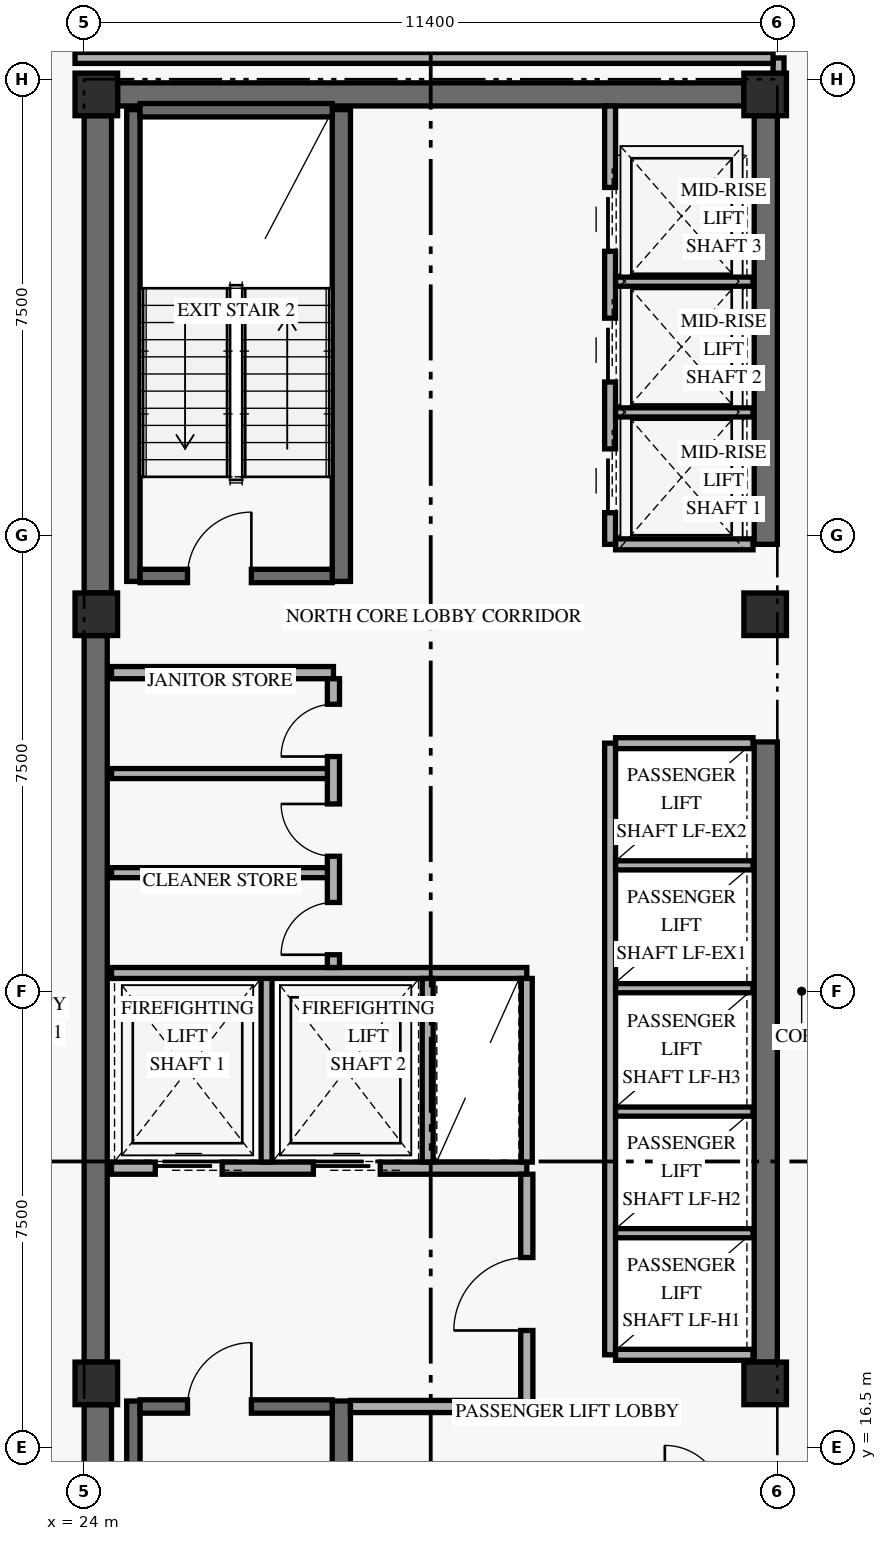
"""IFC4 building model, lengths in metres.
Left out: names, types, materials, properties, quantities, classifications, styles, units other than length and angle.
Written with IfcOpenShell. Run it as: python <this file> out.ifc"""

import sys

from ifc_helpers import new_model, si_unit, direction, frame, frame_2d, origin, origin_2d, place, context, subcontext, project, spatial, rectangle, extrude, element, fill, save


model = new_model("IFC4")
c1 = context("Model", 3, precision=1e-05, world=origin(), true_north=direction((0.0, 1.0)))
c2 = subcontext(c1, "Body", "Model", "MODEL_VIEW")
j1 = project(units=[si_unit("LENGTHUNIT", "METRE"), si_unit("PLANEANGLEUNIT", "RADIAN")], contexts=[c1])
p1 = place(None, origin())
s1 = spatial("IfcSite", under=j1, at=p1, CompositionType="ELEMENT")
p2 = place(p1, origin())
s2 = spatial("IfcBuilding", under=s1, at=p2, CompositionType="ELEMENT")
p3 = place(p2, frame((0.0, 0.0, 173.4)))
s3 = spatial("IfcBuildingStorey", under=s2, at=p3, CompositionType="ELEMENT", Elevation=173.4)
p4 = place(p3, frame((24.225, 9.6, 0.0), z_axis=(0.0, 0.0, 1.0), x_axis=(0.0, 1.0, 0.0)))
e1 = element("IfcWall", 1, at=p4, inside=s3, PredefinedType="SHEAR", context=c2, shape_type="SweptSolid", body=[
    extrude(rectangle(XDim=7.6, YDim=0.45, at=frame_2d((3.8, 0.0))), origin(), (0.0, 0.0, 1.0), 3.348),
])
p5 = place(p3, frame((24.19, 17.9, 0.0), z_axis=(0.0, 0.0, 1.0), x_axis=(0.0, 1.0, 0.0)))
e2 = element("IfcWall", 2, at=p5, inside=s3, PredefinedType="SHEAR", context=c2, shape_type="SweptSolid", body=[
    extrude(rectangle(XDim=11.95, YDim=0.38, at=frame_2d((5.975, 0.0))), origin(), (0.0, 0.0, 1.0), 3.348),
])
p6 = place(p3, frame((24.225, 30.55, 0.0), z_axis=(0.0, 0.0, 1.0), x_axis=(0.0, 1.0, 0.0)))
e3 = element("IfcWall", 3, at=p6, inside=s3, PredefinedType="SHEAR", context=c2, shape_type="SweptSolid", body=[
    extrude(rectangle(XDim=7.85, YDim=0.45, at=frame_2d((3.925, 0.0))), origin(), (0.0, 0.0, 1.0), 3.348),
])
p7 = place(p3, frame((35.21, 17.9, 0.0), z_axis=(0.0, 0.0, 1.0), x_axis=(0.0, 1.0, 0.0)))
e4 = element("IfcWall", 4, at=p7, inside=s3, PredefinedType="SHEAR", context=c2, shape_type="SweptSolid", body=[
    extrude(rectangle(XDim=10.2, YDim=0.38, at=frame_2d((5.1, 0.0))), origin(), (0.0, 0.0, 1.0), 3.348),
])
p8 = place(p3, frame((35.21, 31.35, 0.0), z_axis=(0.0, 0.0, 1.0), x_axis=(0.0, 1.0, 0.0)))
e5 = element("IfcWall", 5, at=p8, inside=s3, PredefinedType="SHEAR", context=c2, shape_type="SweptSolid", body=[
    extrude(rectangle(XDim=7.05, YDim=0.38, at=frame_2d((3.525, 0.0))), origin(), (0.0, 0.0, 1.0), 3.348),
])
p9 = place(p3, frame((24.55, 38.75, 0.0), z_axis=(0.0, 0.0, 1.0), x_axis=(1.0, 0.0, 0.0)))
e6 = element("IfcWall", 6, at=p9, inside=s3, PredefinedType="SHEAR", context=c2, shape_type="SweptSolid", body=[
    extrude(rectangle(XDim=10.3, YDim=0.38, at=frame_2d((5.15, 0.0))), origin(), (0.0, 0.0, 1.0), 3.96),
])
p10 = place(p3, frame((24.81, 9.5, 0.0), z_axis=(0.0, 0.0, 1.0), x_axis=(0.0, 1.0, 0.0)))
e7 = element("IfcWall", 7, at=p10, inside=s3, PredefinedType="SHEAR", context=c2, shape_type="SweptSolid", body=[
    extrude(rectangle(XDim=7.76, YDim=0.22, at=frame_2d((3.88, 0.0))), origin(), (0.0, 0.0, 1.0), 3.96),
])
p11 = place(p3, frame((28.23, 9.5, 0.0), z_axis=(0.0, 0.0, 1.0), x_axis=(0.0, 1.0, 0.0)))
e8 = element("IfcWall", 8, at=p11, inside=s3, PredefinedType="SHEAR", context=c2, shape_type="SweptSolid", body=[
    extrude(rectangle(XDim=7.76, YDim=0.3, at=frame_2d((3.88, 0.0))), origin(), (0.0, 0.0, 1.0), 3.96),
])
p12 = place(p3, frame((24.92, 17.17, 0.0), z_axis=(0.0, 0.0, 1.0), x_axis=(1.0, 0.0, 0.0)))
e9 = element("IfcWall", 9, at=p12, inside=s3, PredefinedType="SHEAR", context=c2, shape_type="SweptSolid", body=[
    extrude(rectangle(XDim=3.16, YDim=0.22, at=frame_2d((1.58, 0.0))), origin(), (0.0, 0.0, 1.0), 3.96),
])
p13 = place(p12, frame((0.78, 0.0, 0.0)))
e10 = element("IfcOpeningElement", 10, at=p13, cuts=e9, PredefinedType="OPENING", context=c2, shape_type="SweptSolid", body=[
    extrude(rectangle(XDim=1.05, YDim=2.15, at=frame_2d((0.525, 1.075))), frame((0.0, 0.12, 0.0), z_axis=(0.0, -1.0, 0.0), x_axis=(1.0, 0.0, 0.0)), (0.0, 0.0, 1.0), 0.24),
])
p14 = place(p3, frame((24.81, 30.74, 0.0), z_axis=(0.0, 0.0, 1.0), x_axis=(0.0, 1.0, 0.0)))
e11 = element("IfcWall", 11, at=p14, inside=s3, PredefinedType="SHEAR", context=c2, shape_type="SweptSolid", body=[
    extrude(rectangle(XDim=7.76, YDim=0.22, at=frame_2d((3.88, 0.0))), origin(), (0.0, 0.0, 1.0), 3.96),
])
p15 = place(p3, frame((28.23, 30.74, 0.0), z_axis=(0.0, 0.0, 1.0), x_axis=(0.0, 1.0, 0.0)))
e12 = element("IfcWall", 12, at=p15, inside=s3, PredefinedType="SHEAR", context=c2, shape_type="SweptSolid", body=[
    extrude(rectangle(XDim=7.76, YDim=0.3, at=frame_2d((3.88, 0.0))), origin(), (0.0, 0.0, 1.0), 3.96),
])
p16 = place(p3, frame((24.92, 30.83, 0.0), z_axis=(0.0, 0.0, 1.0), x_axis=(1.0, 0.0, 0.0)))
e13 = element("IfcWall", 13, at=p16, inside=s3, PredefinedType="SHEAR", context=c2, shape_type="SweptSolid", body=[
    extrude(rectangle(XDim=3.16, YDim=0.22, at=frame_2d((1.58, 0.0))), origin(), (0.0, 0.0, 1.0), 3.96),
])
p17 = place(p16, frame((0.78, 0.0, 0.0)))
e14 = element("IfcOpeningElement", 14, at=p17, cuts=e13, PredefinedType="OPENING", context=c2, shape_type="SweptSolid", body=[
    extrude(rectangle(XDim=1.05, YDim=2.15, at=frame_2d((0.525, 1.075))), frame((0.0, 0.12, 0.0), z_axis=(0.0, -1.0, 0.0), x_axis=(1.0, 0.0, 0.0)), (0.0, 0.0, 1.0), 0.24),
])
p18 = place(p3, frame((24.92, 38.49, 0.0), z_axis=(0.0, 0.0, 1.0), x_axis=(1.0, 0.0, 0.0)))
e15 = element("IfcWall", 15, at=p18, inside=s3, PredefinedType="SHEAR", context=c2, shape_type="SweptSolid", body=[
    extrude(rectangle(XDim=3.16, YDim=0.22, at=frame_2d((1.58, 0.0))), origin(), (0.0, 0.0, 1.0), 3.96),
])
for number, where, z_axis, x_axis in (
    (16, (24.2, 17.55, 0.0), (0.0, 0.0, 1.0), (1.0, 0.0, 0.0)),
    (17, (24.2, 30.2, 0.0), (0.0, 0.0, 1.0), (1.0, 0.0, 0.0)),
    (18, (24.2, 38.75, 0.0), (0.0, 0.0, 1.0), (1.0, 0.0, 0.0)),
    (19, (35.2, 17.55, 0.0), (0.0, 0.0, 1.0), (1.0, 0.0, 0.0)),
    (20, (35.2, 30.2, 0.0), (0.0, 0.0, 1.0), (1.0, 0.0, 0.0)),
    (21, (35.2, 38.75, 0.0), (0.0, 0.0, 1.0), (1.0, 0.0, 0.0)),
):
    element("IfcColumn", number, at=place(p3, frame(where, z_axis=z_axis, x_axis=x_axis)), inside=s3, PredefinedType="COLUMN", context=c2, shape_type="SweptSolid", body=[
        extrude(rectangle(XDim=0.7, YDim=0.7, at=origin_2d()), origin(), (0.0, 0.0, 1.0), 4.2),
    ])
p19 = place(p3, frame((24.45, 21.09, 0.0), z_axis=(0.0, 0.0, 1.0), x_axis=(1.0, 0.0, 0.0)))
e22 = element("IfcWall", 22, at=p19, inside=s3, PredefinedType="STANDARD", context=c2, shape_type="SweptSolid", body=[
    extrude(rectangle(XDim=6.83, YDim=0.2, at=frame_2d((3.415, 0.0))), origin(), (0.0, 0.0, 1.0), 3.96),
])
p20 = place(p19, frame((0.72, 0.0, 0.0)))
e23 = element("IfcOpeningElement", 23, at=p20, cuts=e22, PredefinedType="OPENING", context=c2, shape_type="SweptSolid", body=[
    extrude(rectangle(XDim=1.1, YDim=2.2, at=frame_2d((0.55, 1.1))), frame((0.0, 0.11, 0.0), z_axis=(0.0, -1.0, 0.0), x_axis=(1.0, 0.0, 0.0)), (0.0, 0.0, 1.0), 0.22),
])
p21 = place(p19, frame((3.32, 0.0, 0.0)))
e24 = element("IfcOpeningElement", 24, at=p21, cuts=e22, PredefinedType="OPENING", context=c2, shape_type="SweptSolid", body=[
    extrude(rectangle(XDim=1.1, YDim=2.2, at=frame_2d((0.55, 1.1))), frame((0.0, 0.11, 0.0), z_axis=(0.0, -1.0, 0.0), x_axis=(1.0, 0.0, 0.0)), (0.0, 0.0, 1.0), 0.22),
])
p22 = place(p3, frame((28.38, 17.17, 0.0), z_axis=(0.0, 0.0, 1.0), x_axis=(1.0, 0.0, 0.0)))
e25 = element("IfcWall", 25, at=p22, inside=s3, PredefinedType="STANDARD", context=c2, shape_type="SweptSolid", body=[
    extrude(rectangle(XDim=2.9, YDim=0.2, at=frame_2d((1.45, 0.0))), origin(), (0.0, 0.0, 1.0), 3.96),
])
p23 = place(p3, frame((31.28, 17.07, 0.0), z_axis=(0.0, 0.0, 1.0), x_axis=(0.0, 1.0, 0.0)))
e26 = element("IfcWall", 26, at=p23, inside=s3, PredefinedType="STANDARD", context=c2, shape_type="SweptSolid", body=[
    extrude(rectangle(XDim=3.92, YDim=0.2, at=frame_2d((1.96, 0.0))), origin(), (0.0, 0.0, 1.0), 3.33),
])
p24 = place(p23, frame((1.35, 0.0, 0.0)))
e27 = element("IfcOpeningElement", 27, at=p24, cuts=e26, PredefinedType="OPENING", context=c2, shape_type="SweptSolid", body=[
    extrude(rectangle(XDim=1.2, YDim=2.15, at=frame_2d((0.6, 1.075))), frame((0.0, 0.11, 0.0), z_axis=(0.0, -1.0, 0.0), x_axis=(1.0, 0.0, 0.0)), (0.0, 0.0, 1.0), 0.22),
])
p25 = place(p3, frame((27.0, 21.19, 0.0), z_axis=(0.0, 0.0, 1.0), x_axis=(0.0, 1.0, 0.0)))
e28 = element("IfcWall", 28, at=p25, inside=s3, PredefinedType="STANDARD", context=c2, shape_type="SweptSolid", body=[
    extrude(rectangle(XDim=3.11, YDim=0.18, at=frame_2d((1.555, 0.0))), origin(), (0.0, 0.0, 1.0), 3.96),
])
p26 = place(p3, frame((24.45, 24.3, 0.0), z_axis=(0.0, 0.0, 1.0), x_axis=(1.0, 0.0, 0.0)))
e29 = element("IfcWall", 29, at=p26, inside=s3, PredefinedType="STANDARD", context=c2, shape_type="SweptSolid", body=[
    extrude(rectangle(XDim=6.83, YDim=0.18, at=frame_2d((3.415, 0.0))), origin(), (0.0, 0.0, 1.0), 3.96),
])
for number, where, z_axis, x_axis in (
    (30, (29.65, 21.19, 0.0), (0.0, 0.0, 1.0), (0.0, 1.0, 0.0)),
    (31, (31.28, 21.19, 0.0), (0.0, 0.0, 1.0), (0.0, 1.0, 0.0)),
):
    element("IfcWall", number, at=place(p3, frame(where, z_axis=z_axis, x_axis=x_axis)), inside=s3, PredefinedType="STANDARD", context=c2, shape_type="SweptSolid", body=[
        extrude(rectangle(XDim=3.02, YDim=0.18, at=frame_2d((1.51, 0.0))), origin(), (0.0, 0.0, 1.0), 3.96),
    ])
p27 = place(p3, frame((24.45, 29.24, 0.0), z_axis=(0.0, 0.0, 1.0), x_axis=(1.0, 0.0, 0.0)))
e32 = element("IfcWall", 32, at=p27, inside=s3, PredefinedType="STANDARD", context=c2, shape_type="SweptSolid", body=[
    extrude(rectangle(XDim=3.65, YDim=0.2, at=frame_2d((1.825, 0.0))), origin(), (0.0, 0.0, 1.0), 3.96),
])
p28 = place(p3, frame((28.1, 24.39, 0.0), z_axis=(0.0, 0.0, 1.0), x_axis=(0.0, 1.0, 0.0)))
e33 = element("IfcWall", 33, at=p28, inside=s3, PredefinedType="STANDARD", context=c2, shape_type="SweptSolid", body=[
    extrude(rectangle(XDim=4.75, YDim=0.2, at=frame_2d((2.375, 0.0))), origin(), (0.0, 0.0, 1.0), 3.96),
])
p29 = place(p28, frame((0.21, 0.0, 0.0)))
e34 = element("IfcOpeningElement", 34, at=p29, cuts=e33, PredefinedType="OPENING", context=c2, shape_type="SweptSolid", body=[
    extrude(rectangle(XDim=0.86, YDim=2.1, at=frame_2d((0.43, 1.05))), frame((0.0, 0.11, 0.0), z_axis=(0.0, -1.0, 0.0), x_axis=(1.0, 0.0, 0.0)), (0.0, 0.0, 1.0), 0.22),
])
p30 = place(p28, frame((1.83, 0.0, 0.0)))
e35 = element("IfcOpeningElement", 35, at=p30, cuts=e33, PredefinedType="OPENING", context=c2, shape_type="SweptSolid", body=[
    extrude(rectangle(XDim=0.86, YDim=2.1, at=frame_2d((0.43, 1.05))), frame((0.0, 0.11, 0.0), z_axis=(0.0, -1.0, 0.0), x_axis=(1.0, 0.0, 0.0)), (0.0, 0.0, 1.0), 0.22),
])
p31 = place(p28, frame((3.47, 0.0, 0.0)))
e36 = element("IfcOpeningElement", 36, at=p31, cuts=e33, PredefinedType="OPENING", context=c2, shape_type="SweptSolid", body=[
    extrude(rectangle(XDim=0.86, YDim=2.1, at=frame_2d((0.43, 1.05))), frame((0.0, 0.11, 0.0), z_axis=(0.0, -1.0, 0.0), x_axis=(1.0, 0.0, 0.0)), (0.0, 0.0, 1.0), 0.22),
])
for number, where, z_axis, x_axis in (
    (37, (24.45, 25.95, 0.0), (0.0, 0.0, 1.0), (1.0, 0.0, 0.0)),
    (38, (24.45, 27.58, 0.0), (0.0, 0.0, 1.0), (1.0, 0.0, 0.0)),
):
    element("IfcWall", number, at=place(p3, frame(where, z_axis=z_axis, x_axis=x_axis)), inside=s3, PredefinedType="PARTITIONING", context=c2, shape_type="SweptSolid", body=[
        extrude(rectangle(XDim=3.55, YDim=0.165, at=frame_2d((1.775, 0.0))), origin(), (0.0, 0.0, 1.0), 3.96),
    ])
p32 = place(p3, frame((32.65, 18.02, 0.0), z_axis=(0.0, 0.0, 1.0), x_axis=(0.0, 1.0, 0.0)))
e39 = element("IfcWall", 39, at=p32, inside=s3, PredefinedType="STANDARD", context=c2, shape_type="SweptSolid", body=[
    extrude(rectangle(XDim=10.06, YDim=0.18, at=frame_2d((5.03, 0.0))), origin(), (0.0, 0.0, 1.0), 3.96),
])
for number, where, z_axis, x_axis in (
    (40, (32.74, 18.02, 0.0), (0.0, 0.0, 1.0), (1.0, 0.0, 0.0)),
    (41, (32.74, 28.08, 0.0), (0.0, 0.0, 1.0), (1.0, 0.0, 0.0)),
):
    element("IfcWall", number, at=place(p3, frame(where, z_axis=z_axis, x_axis=x_axis)), inside=s3, PredefinedType="STANDARD", context=c2, shape_type="SweptSolid", body=[
        extrude(rectangle(XDim=2.26, YDim=0.18, at=frame_2d((1.13, 0.0))), origin(), (0.0, 0.0, 1.0), 3.96),
    ])
for number, where, z_axis, x_axis in (
    (42, (32.74, 20.02, 0.0), (0.0, 0.0, 1.0), (1.0, 0.0, 0.0)),
    (43, (32.74, 22.02, 0.0), (0.0, 0.0, 1.0), (1.0, 0.0, 0.0)),
    (44, (32.74, 24.05, 0.0), (0.0, 0.0, 1.0), (1.0, 0.0, 0.0)),
    (45, (32.74, 26.07, 0.0), (0.0, 0.0, 1.0), (1.0, 0.0, 0.0)),
):
    element("IfcWall", number, at=place(p3, frame(where, z_axis=z_axis, x_axis=x_axis)), inside=s3, PredefinedType="STANDARD", context=c2, shape_type="SweptSolid", body=[
        extrude(rectangle(XDim=2.26, YDim=0.15, at=frame_2d((1.13, 0.0))), origin(), (0.0, 0.0, 1.0), 3.96),
    ])
p33 = place(p3, frame((32.65, 31.35, 0.0), z_axis=(0.0, 0.0, 1.0), x_axis=(0.0, 1.0, 0.0)))
e46 = element("IfcWall", 46, at=p33, inside=s3, PredefinedType="STANDARD", context=c2, shape_type="SweptSolid", body=[
    extrude(rectangle(XDim=7.21, YDim=0.18, at=frame_2d((3.605, 0.0))), origin(), (0.0, 0.0, 1.0), 3.96),
])
p34 = place(p33, frame((0.52, 0.0, 0.0)))
e47 = element("IfcOpeningElement", 47, at=p34, cuts=e46, PredefinedType="OPENING", context=c2, shape_type="SweptSolid", body=[
    extrude(rectangle(XDim=1.05, YDim=2.2, at=frame_2d((0.525, 1.1))), frame((0.0, 0.1, 0.0), z_axis=(0.0, -1.0, 0.0), x_axis=(1.0, 0.0, 0.0)), (0.0, 0.0, 1.0), 0.2),
])
p35 = place(p33, frame((2.67, 0.0, 0.0)))
e48 = element("IfcOpeningElement", 48, at=p35, cuts=e46, PredefinedType="OPENING", context=c2, shape_type="SweptSolid", body=[
    extrude(rectangle(XDim=1.05, YDim=2.2, at=frame_2d((0.525, 1.1))), frame((0.0, 0.1, 0.0), z_axis=(0.0, -1.0, 0.0), x_axis=(1.0, 0.0, 0.0)), (0.0, 0.0, 1.0), 0.2),
])
p36 = place(p33, frame((4.82, 0.0, 0.0)))
e49 = element("IfcOpeningElement", 49, at=p36, cuts=e46, PredefinedType="OPENING", context=c2, shape_type="SweptSolid", body=[
    extrude(rectangle(XDim=1.05, YDim=2.2, at=frame_2d((0.525, 1.1))), frame((0.0, 0.1, 0.0), z_axis=(0.0, -1.0, 0.0), x_axis=(1.0, 0.0, 0.0)), (0.0, 0.0, 1.0), 0.2),
])
p37 = place(p3, frame((32.74, 31.35, 0.0), z_axis=(0.0, 0.0, 1.0), x_axis=(1.0, 0.0, 0.0)))
e50 = element("IfcWall", 50, at=p37, inside=s3, PredefinedType="STANDARD", context=c2, shape_type="SweptSolid", body=[
    extrude(rectangle(XDim=2.26, YDim=0.18, at=frame_2d((1.13, 0.0))), origin(), (0.0, 0.0, 1.0), 3.96),
])
for number, where, z_axis, x_axis in (
    (51, (32.74, 33.52, 0.0), (0.0, 0.0, 1.0), (1.0, 0.0, 0.0)),
    (52, (32.74, 35.67, 0.0), (0.0, 0.0, 1.0), (1.0, 0.0, 0.0)),
):
    element("IfcWall", number, at=place(p3, frame(where, z_axis=z_axis, x_axis=x_axis)), inside=s3, PredefinedType="STANDARD", context=c2, shape_type="SweptSolid", body=[
        extrude(rectangle(XDim=2.26, YDim=0.15, at=frame_2d((1.13, 0.0))), origin(), (0.0, 0.0, 1.0), 3.96),
    ])
p38 = place(p3, frame((35.42, 38.75, 0.0), z_axis=(0.0, 0.0, 1.0), x_axis=(0.0, 1.0, 0.0)))
e53 = element("IfcWall", 53, at=p38, inside=s3, PredefinedType="STANDARD", context=c2, shape_type="SweptSolid", body=[
    extrude(rectangle(XDim=0.6, YDim=0.18, at=frame_2d((0.3, 0.0))), origin(), (0.0, 0.0, 1.0), 3.33),
])
p39 = place(p3, frame((23.85, 39.35, 0.0), z_axis=(0.0, 0.0, 1.0), x_axis=(1.0, 0.0, 0.0)))
e54 = element("IfcWall", 54, at=p39, inside=s3, PredefinedType="STANDARD", context=c2, shape_type="SweptSolid", body=[
    extrude(rectangle(XDim=11.48, YDim=0.18, at=frame_2d((5.74, 0.0))), origin(), (0.0, 0.0, 1.0), 3.33),
])
p40 = place(p13, frame((1.05, 0.0, 0.0), z_axis=(0.0, 0.0, 1.0), x_axis=(-1.0, 0.0, 0.0)))
e55 = element("IfcDoor", 55, at=p40, inside=s3, OperationType="SINGLE_SWING_LEFT", PredefinedType="DOOR", context=c2, shape_type="SweptSolid", body=[
    extrude(rectangle(XDim=1.05, YDim=2.15, at=frame_2d((0.525, 1.075))), frame((0.0, 0.025, 0.0), z_axis=(0.0, -1.0, 0.0), x_axis=(1.0, 0.0, 0.0)), (0.0, 0.0, 1.0), 0.05),
])
fill(e10, e55)
p41 = place(p17, origin())
e56 = element("IfcDoor", 56, at=p41, inside=s3, OperationType="SINGLE_SWING_RIGHT", PredefinedType="DOOR", context=c2, shape_type="SweptSolid", body=[
    extrude(rectangle(XDim=1.05, YDim=2.15, at=frame_2d((0.525, 1.075))), frame((0.0, 0.025, 0.0), z_axis=(0.0, -1.0, 0.0), x_axis=(1.0, 0.0, 0.0)), (0.0, 0.0, 1.0), 0.05),
])
fill(e14, e56)
p42 = place(p20, origin())
e57 = element("IfcDoor", 57, at=p42, inside=s3, OperationType="SLIDING_TO_LEFT", PredefinedType="DOOR", context=c2, shape_type="SweptSolid", body=[
    extrude(rectangle(XDim=1.1, YDim=2.2, at=frame_2d((0.55, 1.1))), frame((0.0, 0.025, 0.0), z_axis=(0.0, -1.0, 0.0), x_axis=(1.0, 0.0, 0.0)), (0.0, 0.0, 1.0), 0.05),
])
fill(e23, e57)
p43 = place(p21, origin())
e58 = element("IfcDoor", 58, at=p43, inside=s3, OperationType="SLIDING_TO_LEFT", PredefinedType="DOOR", context=c2, shape_type="SweptSolid", body=[
    extrude(rectangle(XDim=1.1, YDim=2.2, at=frame_2d((0.55, 1.1))), frame((0.0, 0.025, 0.0), z_axis=(0.0, -1.0, 0.0), x_axis=(1.0, 0.0, 0.0)), (0.0, 0.0, 1.0), 0.05),
])
fill(e24, e58)
p44 = place(p24, origin())
e59 = element("IfcDoor", 59, at=p44, inside=s3, OperationType="SINGLE_SWING_LEFT", PredefinedType="DOOR", context=c2, shape_type="SweptSolid", body=[
    extrude(rectangle(XDim=1.2, YDim=2.15, at=frame_2d((0.6, 1.075))), frame((0.0, 0.025, 0.0), z_axis=(0.0, -1.0, 0.0), x_axis=(1.0, 0.0, 0.0)), (0.0, 0.0, 1.0), 0.05),
])
fill(e27, e59)
p45 = place(p29, origin())
e60 = element("IfcDoor", 60, at=p45, inside=s3, OperationType="SINGLE_SWING_LEFT", PredefinedType="DOOR", context=c2, shape_type="SweptSolid", body=[
    extrude(rectangle(XDim=0.86, YDim=2.1, at=frame_2d((0.43, 1.05))), frame((0.0, 0.025, 0.0), z_axis=(0.0, -1.0, 0.0), x_axis=(1.0, 0.0, 0.0)), (0.0, 0.0, 1.0), 0.05),
])
fill(e34, e60)
p46 = place(p30, origin())
e61 = element("IfcDoor", 61, at=p46, inside=s3, OperationType="SINGLE_SWING_RIGHT", PredefinedType="DOOR", context=c2, shape_type="SweptSolid", body=[
    extrude(rectangle(XDim=0.86, YDim=2.1, at=frame_2d((0.43, 1.05))), frame((0.0, 0.025, 0.0), z_axis=(0.0, -1.0, 0.0), x_axis=(1.0, 0.0, 0.0)), (0.0, 0.0, 1.0), 0.05),
])
fill(e35, e61)
p47 = place(p31, origin())
e62 = element("IfcDoor", 62, at=p47, inside=s3, OperationType="SINGLE_SWING_LEFT", PredefinedType="DOOR", context=c2, shape_type="SweptSolid", body=[
    extrude(rectangle(XDim=0.86, YDim=2.1, at=frame_2d((0.43, 1.05))), frame((0.0, 0.025, 0.0), z_axis=(0.0, -1.0, 0.0), x_axis=(1.0, 0.0, 0.0)), (0.0, 0.0, 1.0), 0.05),
])
fill(e36, e62)
p48 = place(p34, origin())
e63 = element("IfcDoor", 63, at=p48, inside=s3, OperationType="SLIDING_TO_LEFT", PredefinedType="DOOR", context=c2, shape_type="SweptSolid", body=[
    extrude(rectangle(XDim=1.05, YDim=2.2, at=frame_2d((0.525, 1.1))), frame((0.0, 0.025, 0.0), z_axis=(0.0, -1.0, 0.0), x_axis=(1.0, 0.0, 0.0)), (0.0, 0.0, 1.0), 0.05),
])
fill(e47, e63)
p49 = place(p35, origin())
e64 = element("IfcDoor", 64, at=p49, inside=s3, OperationType="SLIDING_TO_LEFT", PredefinedType="DOOR", context=c2, shape_type="SweptSolid", body=[
    extrude(rectangle(XDim=1.05, YDim=2.2, at=frame_2d((0.525, 1.1))), frame((0.0, 0.025, 0.0), z_axis=(0.0, -1.0, 0.0), x_axis=(1.0, 0.0, 0.0)), (0.0, 0.0, 1.0), 0.05),
])
fill(e48, e64)
p50 = place(p36, origin())
e65 = element("IfcDoor", 65, at=p50, inside=s3, OperationType="SLIDING_TO_LEFT", PredefinedType="DOOR", context=c2, shape_type="SweptSolid", body=[
    extrude(rectangle(XDim=1.05, YDim=2.2, at=frame_2d((0.525, 1.1))), frame((0.0, 0.025, 0.0), z_axis=(0.0, -1.0, 0.0), x_axis=(1.0, 0.0, 0.0)), (0.0, 0.0, 1.0), 0.05),
])
fill(e49, e65)
save(model, sys.argv[1])
